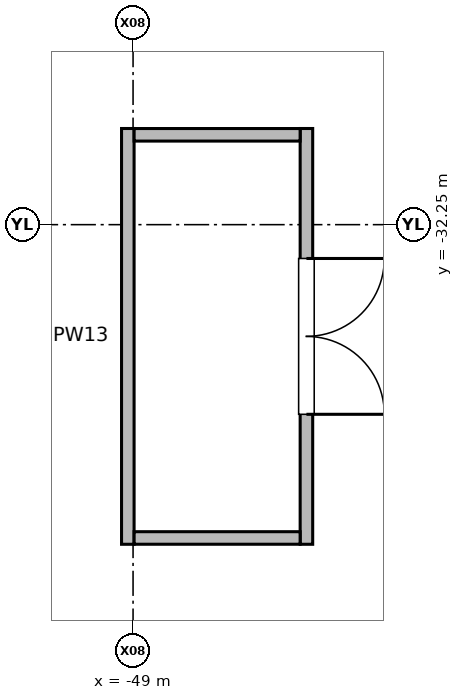
"""IFC4 building model, lengths in metres.
Left out: names, types, materials, properties, quantities, classifications, styles, units other than length and angle.
Written with IfcOpenShell. Run it as: python <this file> out.ifc"""

import sys

from ifc_helpers import new_model, si_unit, direction, frame, frame_2d, origin, place, context, subcontext, project, spatial, rectangle, extrude, element, fill, save


model = new_model("IFC4")
c1 = context("Model", 3, precision=1e-05, world=origin(), true_north=direction((0.0, 1.0)))
c2 = subcontext(c1, "Body", "Model", "MODEL_VIEW")
j1 = project(units=[si_unit("LENGTHUNIT", "METRE"), si_unit("PLANEANGLEUNIT", "RADIAN")], contexts=[c1])
p1 = place(None, origin())
s1 = spatial("IfcSite", under=j1, at=p1, CompositionType="ELEMENT")
p2 = place(p1, origin())
s2 = spatial("IfcBuilding", under=s1, at=p2, CompositionType="ELEMENT")
p3 = place(p2, origin())
s3 = spatial("IfcBuildingStorey", under=s2, at=p3, CompositionType="ELEMENT", Elevation=0.0)
p4 = place(p3, frame((-46.719, -30.985, 0.0), z_axis=(0.0, 0.0, 1.0), x_axis=(0.0, -1.0, 0.0)))
e1 = element("IfcWall", 1, at=p4, inside=s3, PredefinedType="PARTITIONING", context=c2, shape_type="SweptSolid", body=[
    extrude(rectangle(XDim=5.47, YDim=0.165, at=frame_2d((2.735, 0.0))), origin(), (0.0, 0.0, 1.0), 5.02),
])
p5 = place(p4, frame((1.71, 0.0, 0.0)))
e2 = element("IfcOpeningElement", 2, at=p5, cuts=e1, PredefinedType="OPENING", context=c2, shape_type="SweptSolid", body=[
    extrude(rectangle(XDim=2.05, YDim=2.4, at=frame_2d((1.025, 1.2))), frame((0.0, 0.093, 0.0), z_axis=(0.0, -1.0, 0.0), x_axis=(1.0, 0.0, 0.0)), (0.0, 0.0, 1.0), 0.185),
])
p6 = place(p3, frame((-49.069, -36.455, 0.0), z_axis=(0.0, 0.0, 1.0), x_axis=(0.0, 1.0, 0.0)))
e3 = element("IfcWall", 3, at=p6, inside=s3, PredefinedType="PARTITIONING", context=c2, shape_type="SweptSolid", body=[
    extrude(rectangle(XDim=5.47, YDim=0.165, at=frame_2d((2.735, 0.0))), origin(), (0.0, 0.0, 1.0), 5.02),
])
for number, where, z_axis, x_axis in (
    (4, (-48.986, -36.372, 0.0), (0.0, 0.0, 1.0), (1.0, 0.0, 0.0)),
    (5, (-48.986, -31.068, 0.0), (0.0, 0.0, 1.0), (1.0, 0.0, 0.0)),
):
    element("IfcWall", number, at=place(p3, frame(where, z_axis=z_axis, x_axis=x_axis)), inside=s3, PredefinedType="PARTITIONING", context=c2, shape_type="SweptSolid", body=[
        extrude(rectangle(XDim=2.184, YDim=0.165, at=frame_2d((1.092, 0.0))), origin(), (0.0, 0.0, 1.0), 5.02),
    ])
p7 = place(p5, origin())
e6 = element("IfcDoor", 6, at=p7, inside=s3, OperationType="DOUBLE_DOOR_SINGLE_SWING", PredefinedType="DOOR", context=c2, shape_type="SweptSolid", body=[
    extrude(rectangle(XDim=2.05, YDim=2.4, at=frame_2d((1.025, 1.2))), frame((0.0, 0.025, 0.0), z_axis=(0.0, -1.0, 0.0), x_axis=(1.0, 0.0, 0.0)), (0.0, 0.0, 1.0), 0.05),
])
fill(e2, e6)
save(model, sys.argv[1])
